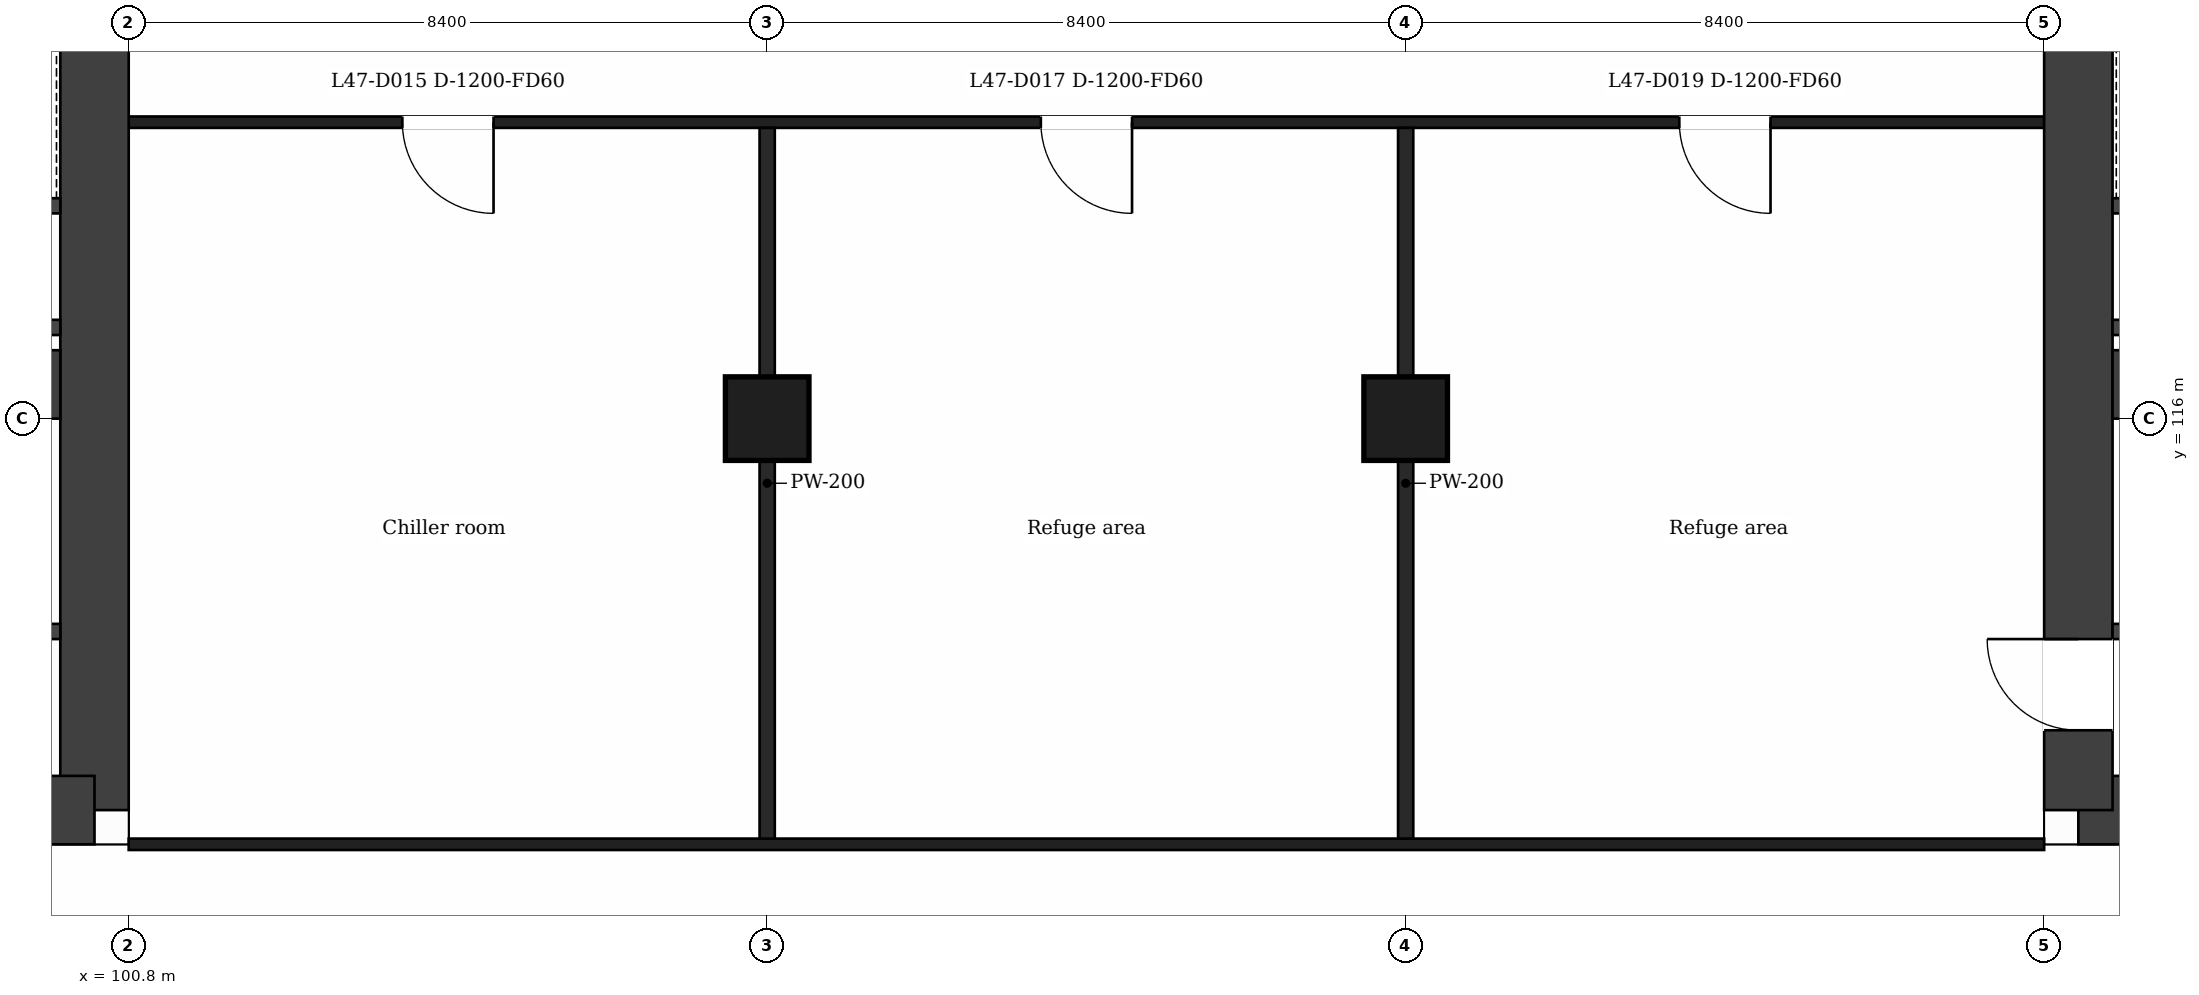
"""IFC4 building model, lengths in metres.
Left out: names, types, materials, properties, quantities, classifications, styles, units other than length and angle.
Written with IfcOpenShell. Run it as: python <this file> out.ifc"""

import sys

from ifc_helpers import new_model, si_unit, direction, frame, frame_2d, origin, origin_2d, place, context, subcontext, project, spatial, rectangle, extrude, element, fill, save


model = new_model("IFC4")
c1 = context("Model", 3, precision=1e-05, world=origin(), true_north=direction((0.0, 1.0)))
c2 = subcontext(c1, "Body", "Model", "MODEL_VIEW")
j1 = project(units=[si_unit("LENGTHUNIT", "METRE"), si_unit("PLANEANGLEUNIT", "RADIAN")], contexts=[c1])
p1 = place(None, origin())
s1 = spatial("IfcSite", under=j1, at=p1, CompositionType="ELEMENT")
p2 = place(p1, origin())
s2 = spatial("IfcBuilding", under=s1, at=p2, CompositionType="ELEMENT")
p3 = place(p2, frame((0.0, 0.0, 197.2)))
s3 = spatial("IfcBuildingStorey", under=s2, at=p3, CompositionType="ELEMENT", Elevation=197.2)
p4 = place(p3, frame((100.35, 131.95, 0.0), z_axis=(0.0, 0.0, 1.0), x_axis=(0.0, -1.0, 0.0)))
e1 = element("IfcWall", 1, at=p4, inside=s3, PredefinedType="SHEAR", context=c2, shape_type="SweptSolid", body=[
    extrude(rectangle(XDim=21.1, YDim=0.9, at=frame_2d((10.55, 0.0))), origin(), (0.0, 0.0, 1.0), 5.0),
])
p5 = place(p4, frame((2.35, 0.0, 0.0)))
e2 = element("IfcOpeningElement", 2, at=p5, cuts=e1, PredefinedType="OPENING", context=c2, shape_type="SweptSolid", body=[
    extrude(rectangle(XDim=1.2, YDim=2.1, at=frame_2d((0.6, 1.05))), frame((0.0, 0.46, 0.0), z_axis=(0.0, -1.0, 0.0), x_axis=(1.0, 0.0, 0.0)), (0.0, 0.0, 1.0), 0.92),
])
p6 = place(p4, frame((7.8, 0.0, 0.0)))
e3 = element("IfcOpeningElement", 3, at=p6, cuts=e1, PredefinedType="OPENING", context=c2, shape_type="SweptSolid", body=[
    extrude(rectangle(XDim=1.4, YDim=2.1, at=frame_2d((0.7, 1.05))), frame((0.0, 0.46, 0.0), z_axis=(0.0, -1.0, 0.0), x_axis=(1.0, 0.0, 0.0)), (0.0, 0.0, 1.0), 0.92),
])
p7 = place(p3, frame((100.35, 110.85, 0.0), z_axis=(0.0, 0.0, 1.0), x_axis=(-1.0, 0.0, 0.0)))
e4 = element("IfcWall", 4, at=p7, inside=s3, PredefinedType="SHEAR", context=c2, shape_type="SweptSolid", body=[
    extrude(rectangle(XDim=14.166, YDim=0.9, at=frame_2d((7.083, 0.0))), origin(), (0.0, 0.0, 1.0), 5.0),
])
p8 = place(p7, frame((5.855, 0.0, 0.0)))
e5 = element("IfcOpeningElement", 5, at=p8, cuts=e4, PredefinedType="OPENING", context=c2, shape_type="SweptSolid", body=[
    extrude(rectangle(XDim=1.4, YDim=2.1, at=frame_2d((0.7, 1.05))), frame((0.0, 0.46, 0.0), z_axis=(0.0, -1.0, 0.0), x_axis=(1.0, 0.0, 0.0)), (0.0, 0.0, 1.0), 0.92),
])
p9 = place(p3, frame((94.8, 116.45, 0.0), z_axis=(0.0, 0.0, 1.0), x_axis=(1.0, 0.0, 0.0)))
e6 = element("IfcWall", 6, at=p9, inside=s3, PredefinedType="SHEAR", context=c2, shape_type="SweptSolid", body=[
    extrude(rectangle(XDim=5.1, YDim=0.9, at=frame_2d((2.55, 0.0))), origin(), (0.0, 0.0, 1.0), 5.0),
])
p10 = place(p3, frame((140.616, 110.85, 0.0), z_axis=(0.0, 0.0, 1.0), x_axis=(-1.0, 0.0, 0.0)))
e7 = element("IfcWall", 7, at=p10, inside=s3, PredefinedType="SHEAR", context=c2, shape_type="SweptSolid", body=[
    extrude(rectangle(XDim=14.166, YDim=0.9, at=frame_2d((7.083, 0.0))), origin(), (0.0, 0.0, 1.0), 5.0),
])
p11 = place(p10, frame((6.911, 0.0, 0.0)))
e8 = element("IfcOpeningElement", 8, at=p11, cuts=e7, PredefinedType="OPENING", context=c2, shape_type="SweptSolid", body=[
    extrude(rectangle(XDim=1.4, YDim=2.1, at=frame_2d((0.7, 1.05))), frame((0.0, 0.46, 0.0), z_axis=(0.0, -1.0, 0.0), x_axis=(1.0, 0.0, 0.0)), (0.0, 0.0, 1.0), 0.92),
])
p12 = place(p3, frame((126.45, 110.85, 0.0), z_axis=(0.0, 0.0, 1.0), x_axis=(0.0, 1.0, 0.0)))
e9 = element("IfcWall", 9, at=p12, inside=s3, PredefinedType="SHEAR", context=c2, shape_type="SweptSolid", body=[
    extrude(rectangle(XDim=21.1, YDim=0.9, at=frame_2d((10.55, 0.0))), origin(), (0.0, 0.0, 1.0), 5.0),
])
p13 = place(p12, frame((1.05, 0.0, 0.0)))
e10 = element("IfcOpeningElement", 10, at=p13, cuts=e9, PredefinedType="OPENING", context=c2, shape_type="SweptSolid", body=[
    extrude(rectangle(XDim=1.2, YDim=2.1, at=frame_2d((0.6, 1.05))), frame((0.0, 0.46, 0.0), z_axis=(0.0, -1.0, 0.0), x_axis=(1.0, 0.0, 0.0)), (0.0, 0.0, 1.0), 0.92),
])
p14 = place(p12, frame((11.9, 0.0, 0.0)))
e11 = element("IfcOpeningElement", 11, at=p14, cuts=e9, PredefinedType="OPENING", context=c2, shape_type="SweptSolid", body=[
    extrude(rectangle(XDim=1.4, YDim=2.1, at=frame_2d((0.7, 1.05))), frame((0.0, 0.46, 0.0), z_axis=(0.0, -1.0, 0.0), x_axis=(1.0, 0.0, 0.0)), (0.0, 0.0, 1.0), 0.92),
])
p15 = place(p3, frame((126.9, 116.45, 0.0), z_axis=(0.0, 0.0, 1.0), x_axis=(1.0, 0.0, 0.0)))
e12 = element("IfcWall", 12, at=p15, inside=s3, PredefinedType="SHEAR", context=c2, shape_type="SweptSolid", body=[
    extrude(rectangle(XDim=5.1, YDim=0.9, at=frame_2d((2.55, 0.0))), origin(), (0.0, 0.0, 1.0), 5.0),
])
for number, where, z_axis, x_axis in (
    (13, (109.2, 116.0, 0.0), (0.0, 0.0, 1.0), (1.0, 0.0, 0.0)),
    (14, (117.6, 116.0, 0.0), (0.0, 0.0, 1.0), (1.0, 0.0, 0.0)),
):
    element("IfcColumn", number, at=place(p3, frame(where, z_axis=z_axis, x_axis=x_axis)), inside=s3, PredefinedType="COLUMN", context=c2, shape_type="SweptSolid", body=[
        extrude(rectangle(XDim=1.1, YDim=1.1, at=origin_2d()), origin(), (0.0, 0.0, 1.0), 5.0),
    ])
p16 = place(p3, frame((100.8, 110.4, 0.0), z_axis=(0.0, 0.0, 1.0), x_axis=(1.0, 0.0, 0.0)))
e15 = element("IfcWall", 15, at=p16, inside=s3, PredefinedType="PARTITIONING", context=c2, shape_type="SweptSolid", body=[
    extrude(rectangle(XDim=25.2, YDim=0.15, at=frame_2d((12.6, 0.0))), origin(), (0.0, 0.0, 1.0), 4.68),
])
p17 = place(p3, frame((95.127, 113.2, 0.0), z_axis=(0.0, 0.0, 1.0), x_axis=(1.0, 0.0, 0.0)))
e16 = element("IfcWall", 16, at=p17, inside=s3, PredefinedType="PARTITIONING", context=c2, shape_type="SweptSolid", body=[
    extrude(rectangle(XDim=4.773, YDim=0.2, at=frame_2d((2.386, 0.0))), origin(), (0.0, 0.0, 1.0), 4.68),
])
p18 = place(p3, frame((126.9, 113.2, 0.0), z_axis=(0.0, 0.0, 1.0), x_axis=(1.0, 0.0, 0.0)))
e17 = element("IfcWall", 17, at=p18, inside=s3, PredefinedType="PARTITIONING", context=c2, shape_type="SweptSolid", body=[
    extrude(rectangle(XDim=4.773, YDim=0.2, at=frame_2d((2.387, 0.0))), origin(), (0.0, 0.0, 1.0), 4.68),
])
p19 = place(p3, frame((95.227, 117.2, 0.0), z_axis=(0.0, 0.0, 1.0), x_axis=(1.0, 0.0, 0.0)))
e18 = element("IfcWall", 18, at=p19, inside=s3, PredefinedType="PARTITIONING", context=c2, shape_type="SweptSolid", body=[
    extrude(rectangle(XDim=4.673, YDim=0.2, at=frame_2d((2.336, 0.0))), origin(), (0.0, 0.0, 1.0), 4.68),
])
p20 = place(p3, frame((126.9, 117.2, 0.0), z_axis=(0.0, 0.0, 1.0), x_axis=(1.0, 0.0, 0.0)))
e19 = element("IfcWall", 19, at=p20, inside=s3, PredefinedType="PARTITIONING", context=c2, shape_type="SweptSolid", body=[
    extrude(rectangle(XDim=4.673, YDim=0.2, at=frame_2d((2.336, 0.0))), origin(), (0.0, 0.0, 1.0), 4.68),
])
p21 = place(p3, frame((95.227, 118.8, 0.0), z_axis=(0.0, 0.0, 1.0), x_axis=(1.0, 0.0, 0.0)))
e20 = element("IfcWall", 20, at=p21, inside=s3, PredefinedType="PARTITIONING", context=c2, shape_type="SweptSolid", body=[
    extrude(rectangle(XDim=4.673, YDim=0.2, at=frame_2d((2.336, 0.0))), origin(), (0.0, 0.0, 1.0), 4.68),
])
p22 = place(p3, frame((126.9, 118.8, 0.0), z_axis=(0.0, 0.0, 1.0), x_axis=(1.0, 0.0, 0.0)))
e21 = element("IfcWall", 21, at=p22, inside=s3, PredefinedType="PARTITIONING", context=c2, shape_type="SweptSolid", body=[
    extrude(rectangle(XDim=4.673, YDim=0.2, at=frame_2d((2.336, 0.0))), origin(), (0.0, 0.0, 1.0), 4.68),
])
p23 = place(p3, frame((100.8, 119.9, 0.0), z_axis=(0.0, 0.0, 1.0), x_axis=(1.0, 0.0, 0.0)))
e22 = element("IfcWall", 22, at=p23, inside=s3, PredefinedType="PARTITIONING", context=c2, shape_type="SweptSolid", body=[
    extrude(rectangle(XDim=25.2, YDim=0.15, at=frame_2d((12.6, 0.0))), origin(), (0.0, 0.0, 1.0), 4.68),
])
p24 = place(p23, frame((3.6, 0.0, 0.0)))
e23 = element("IfcOpeningElement", 23, at=p24, cuts=e22, PredefinedType="OPENING", context=c2, shape_type="SweptSolid", body=[
    extrude(rectangle(XDim=1.2, YDim=2.1, at=frame_2d((0.6, 1.05))), frame((0.0, 0.085, 0.0), z_axis=(0.0, -1.0, 0.0), x_axis=(1.0, 0.0, 0.0)), (0.0, 0.0, 1.0), 0.17),
])
p25 = place(p23, frame((12.0, 0.0, 0.0)))
e24 = element("IfcOpeningElement", 24, at=p25, cuts=e22, PredefinedType="OPENING", context=c2, shape_type="SweptSolid", body=[
    extrude(rectangle(XDim=1.2, YDim=2.1, at=frame_2d((0.6, 1.05))), frame((0.0, 0.085, 0.0), z_axis=(0.0, -1.0, 0.0), x_axis=(1.0, 0.0, 0.0)), (0.0, 0.0, 1.0), 0.17),
])
p26 = place(p23, frame((20.4, 0.0, 0.0)))
e25 = element("IfcOpeningElement", 25, at=p26, cuts=e22, PredefinedType="OPENING", context=c2, shape_type="SweptSolid", body=[
    extrude(rectangle(XDim=1.2, YDim=2.1, at=frame_2d((0.6, 1.05))), frame((0.0, 0.085, 0.0), z_axis=(0.0, -1.0, 0.0), x_axis=(1.0, 0.0, 0.0)), (0.0, 0.0, 1.0), 0.17),
])
for number, where, z_axis, x_axis in (
    (26, (109.2, 110.475, 0.0), (0.0, 0.0, 1.0), (0.0, 1.0, 0.0)),
    (27, (117.6, 110.475, 0.0), (0.0, 0.0, 1.0), (0.0, 1.0, 0.0)),
):
    element("IfcWall", number, at=place(p3, frame(where, z_axis=z_axis, x_axis=x_axis)), inside=s3, PredefinedType="PARTITIONING", context=c2, shape_type="SweptSolid", body=[
        extrude(rectangle(XDim=9.35, YDim=0.2, at=frame_2d((4.675, 0.0))), origin(), (0.0, 0.0, 1.0), 4.68),
    ])
p27 = place(p24, origin())
e28 = element("IfcDoor", 28, at=p27, inside=s3, OperationType="SINGLE_SWING_RIGHT", PredefinedType="DOOR", context=c2, shape_type="SweptSolid", body=[
    extrude(rectangle(XDim=1.2, YDim=2.1, at=frame_2d((0.6, 1.05))), frame((0.0, 0.025, 0.0), z_axis=(0.0, -1.0, 0.0), x_axis=(1.0, 0.0, 0.0)), (0.0, 0.0, 1.0), 0.05),
])
fill(e23, e28)
p28 = place(p25, origin())
e29 = element("IfcDoor", 29, at=p28, inside=s3, OperationType="SINGLE_SWING_RIGHT", PredefinedType="DOOR", context=c2, shape_type="SweptSolid", body=[
    extrude(rectangle(XDim=1.2, YDim=2.1, at=frame_2d((0.6, 1.05))), frame((0.0, 0.025, 0.0), z_axis=(0.0, -1.0, 0.0), x_axis=(1.0, 0.0, 0.0)), (0.0, 0.0, 1.0), 0.05),
])
fill(e24, e29)
p29 = place(p26, origin())
e30 = element("IfcDoor", 30, at=p29, inside=s3, OperationType="SINGLE_SWING_RIGHT", PredefinedType="DOOR", context=c2, shape_type="SweptSolid", body=[
    extrude(rectangle(XDim=1.2, YDim=2.1, at=frame_2d((0.6, 1.05))), frame((0.0, 0.025, 0.0), z_axis=(0.0, -1.0, 0.0), x_axis=(1.0, 0.0, 0.0)), (0.0, 0.0, 1.0), 0.05),
])
fill(e25, e30)
p30 = place(p13, origin())
e31 = element("IfcDoor", 31, at=p30, inside=s3, OperationType="SINGLE_SWING_RIGHT", PredefinedType="DOOR", context=c2, shape_type="SweptSolid", body=[
    extrude(rectangle(XDim=1.2, YDim=2.1, at=frame_2d((0.6, 1.05))), frame((0.0, 0.025, 0.0), z_axis=(0.0, -1.0, 0.0), x_axis=(1.0, 0.0, 0.0)), (0.0, 0.0, 1.0), 0.05),
])
fill(e10, e31)
save(model, sys.argv[1])
